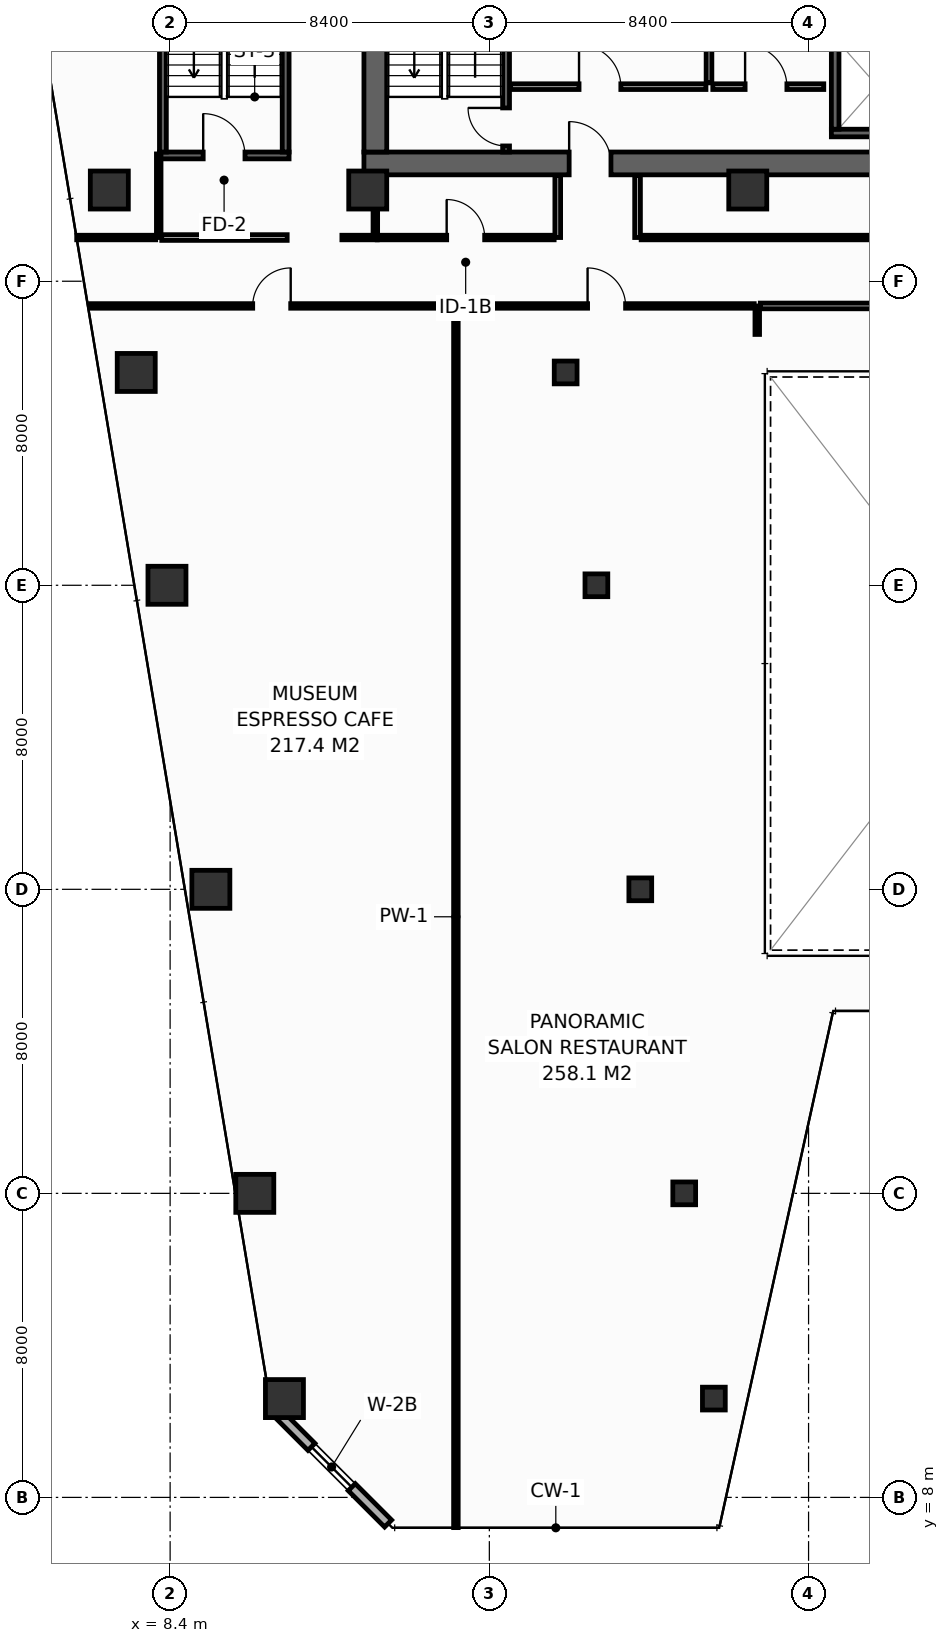
"""IFC4 building model, lengths in metres.
Left out: names, types, materials, properties, quantities, classifications, styles, units other than length and angle.
Written with IfcOpenShell. Run it as: python <this file> out.ifc"""

import sys

from ifc_helpers import new_model, si_unit, direction, frame, frame_2d, origin, origin_2d, place, context, subcontext, project, spatial, rectangle, hollow_rectangle, extrude, element, fill, save


model = new_model("IFC4")
c1 = context("Model", 3, precision=1e-05, world=origin(), true_north=direction((0.0, 1.0)))
c2 = subcontext(c1, "Body", "Model", "MODEL_VIEW")
j1 = project(units=[si_unit("LENGTHUNIT", "METRE"), si_unit("PLANEANGLEUNIT", "RADIAN")], contexts=[c1])
p1 = place(None, origin())
s1 = spatial("IfcSite", under=j1, at=p1, CompositionType="ELEMENT")
p2 = place(p1, origin())
s2 = spatial("IfcBuilding", under=s1, at=p2, CompositionType="ELEMENT")
p3 = place(p2, frame((0.0, 0.0, 110.4)))
s3 = spatial("IfcBuildingStorey", under=s2, at=p3, CompositionType="ELEMENT", Elevation=110.4)
p4 = place(p3, frame((13.5, 43.1, 0.0), z_axis=(0.0, 0.0, 1.0), x_axis=(1.0, 0.0, 0.0)))
e1 = element("IfcWall", 1, at=p4, inside=s3, PredefinedType="SHEAR", context=c2, shape_type="SweptSolid", body=[
    extrude(rectangle(XDim=32.9, YDim=0.6, at=frame_2d((16.45, 0.0))), origin(), (0.0, 0.0, 1.0), 4.15),
])
p5 = place(p4, frame((5.4, 0.0, 0.0)))
e2 = element("IfcOpeningElement", 2, at=p5, cuts=e1, PredefinedType="OPENING", context=c2, shape_type="SweptSolid", body=[
    extrude(rectangle(XDim=1.1, YDim=2.15, at=frame_2d((0.55, 1.075))), frame((0.0, 0.31, 0.0), z_axis=(0.0, -1.0, 0.0), x_axis=(1.0, 0.0, 0.0)), (0.0, 0.0, 1.0), 0.62),
])
p6 = place(p4, frame((25.6, 0.0, 0.0)))
e3 = element("IfcOpeningElement", 3, at=p6, cuts=e1, PredefinedType="OPENING", context=c2, shape_type="SweptSolid", body=[
    extrude(rectangle(XDim=1.1, YDim=2.15, at=frame_2d((0.55, 1.075))), frame((0.0, 0.31, 0.0), z_axis=(0.0, -1.0, 0.0), x_axis=(1.0, 0.0, 0.0)), (0.0, 0.0, 1.0), 0.62),
])
p7 = place(p3, frame((13.8, 43.4, 0.0), z_axis=(0.0, 0.0, 1.0), x_axis=(0.0, 1.0, 0.0)))
e4 = element("IfcWall", 4, at=p7, inside=s3, PredefinedType="SHEAR", context=c2, shape_type="SweptSolid", body=[
    extrude(rectangle(XDim=10.4, YDim=0.6, at=frame_2d((5.2, 0.0))), origin(), (0.0, 0.0, 1.0), 4.15),
])
for number, where, z_axis, x_axis in (
    (5, (6.8, 42.4, 0.0), (0.0, 0.0, 1.0), (1.0, 0.0, 0.0)),
    (6, (13.6, 42.4, 0.0), (0.0, 0.0, 1.0), (1.0, 0.0, 0.0)),
    (7, (23.6, 42.4, 0.0), (0.0, 0.0, 1.0), (1.0, 0.0, 0.0)),
    (8, (11.408, 10.6, 0.0), (0.0, 0.0, 1.0), (1.0, 0.0, 0.0)),
):
    element("IfcColumn", number, at=place(p3, frame(where, z_axis=z_axis, x_axis=x_axis)), inside=s3, PredefinedType="COLUMN", context=c2, shape_type="SweptSolid", body=[
        extrude(hollow_rectangle(XDim=1.0, YDim=1.0, WallThickness=0.045, at=origin_2d()), origin(), (0.0, 0.0, 1.0), 4.4),
    ])
p8 = place(p3, frame((22.708, 10.6, 0.0), z_axis=(0.0, 0.0, 1.0), x_axis=(1.0, 0.0, 0.0)))
e9 = element("IfcColumn", 9, at=p8, inside=s3, PredefinedType="COLUMN", context=c2, shape_type="SweptSolid", body=[
    extrude(hollow_rectangle(XDim=0.6, YDim=0.6, WallThickness=0.028, at=origin_2d()), origin(), (0.0, 0.0, 1.0), 4.4),
])
p9 = place(p3, frame((10.628, 16.0, 0.0), z_axis=(0.0, 0.0, 1.0), x_axis=(1.0, 0.0, 0.0)))
e10 = element("IfcColumn", 10, at=p9, inside=s3, PredefinedType="COLUMN", context=c2, shape_type="SweptSolid", body=[
    extrude(hollow_rectangle(XDim=1.0, YDim=1.0, WallThickness=0.045, at=origin_2d()), origin(), (0.0, 0.0, 1.0), 4.4),
])
p10 = place(p3, frame((21.928, 16.0, 0.0), z_axis=(0.0, 0.0, 1.0), x_axis=(1.0, 0.0, 0.0)))
e11 = element("IfcColumn", 11, at=p10, inside=s3, PredefinedType="COLUMN", context=c2, shape_type="SweptSolid", body=[
    extrude(hollow_rectangle(XDim=0.6, YDim=0.6, WallThickness=0.028, at=origin_2d()), origin(), (0.0, 0.0, 1.0), 4.4),
])
p11 = place(p3, frame((9.472, 24.0, 0.0), z_axis=(0.0, 0.0, 1.0), x_axis=(1.0, 0.0, 0.0)))
e12 = element("IfcColumn", 12, at=p11, inside=s3, PredefinedType="COLUMN", context=c2, shape_type="SweptSolid", body=[
    extrude(hollow_rectangle(XDim=1.0, YDim=1.0, WallThickness=0.045, at=origin_2d()), origin(), (0.0, 0.0, 1.0), 4.4),
])
p12 = place(p3, frame((20.772, 24.0, 0.0), z_axis=(0.0, 0.0, 1.0), x_axis=(1.0, 0.0, 0.0)))
e13 = element("IfcColumn", 13, at=p12, inside=s3, PredefinedType="COLUMN", context=c2, shape_type="SweptSolid", body=[
    extrude(hollow_rectangle(XDim=0.6, YDim=0.6, WallThickness=0.028, at=origin_2d()), origin(), (0.0, 0.0, 1.0), 4.4),
])
p13 = place(p3, frame((8.317, 32.0, 0.0), z_axis=(0.0, 0.0, 1.0), x_axis=(1.0, 0.0, 0.0)))
e14 = element("IfcColumn", 14, at=p13, inside=s3, PredefinedType="COLUMN", context=c2, shape_type="SweptSolid", body=[
    extrude(hollow_rectangle(XDim=1.0, YDim=1.0, WallThickness=0.045, at=origin_2d()), origin(), (0.0, 0.0, 1.0), 4.4),
])
p14 = place(p3, frame((19.617, 32.0, 0.0), z_axis=(0.0, 0.0, 1.0), x_axis=(1.0, 0.0, 0.0)))
e15 = element("IfcColumn", 15, at=p14, inside=s3, PredefinedType="COLUMN", context=c2, shape_type="SweptSolid", body=[
    extrude(hollow_rectangle(XDim=0.6, YDim=0.6, WallThickness=0.028, at=origin_2d()), origin(), (0.0, 0.0, 1.0), 4.4),
])
p15 = place(p3, frame((7.508, 37.6, 0.0), z_axis=(0.0, 0.0, 1.0), x_axis=(1.0, 0.0, 0.0)))
e16 = element("IfcColumn", 16, at=p15, inside=s3, PredefinedType="COLUMN", context=c2, shape_type="SweptSolid", body=[
    extrude(hollow_rectangle(XDim=1.0, YDim=1.0, WallThickness=0.045, at=origin_2d()), origin(), (0.0, 0.0, 1.0), 4.4),
])
p16 = place(p3, frame((18.808, 37.6, 0.0), z_axis=(0.0, 0.0, 1.0), x_axis=(1.0, 0.0, 0.0)))
e17 = element("IfcColumn", 17, at=p16, inside=s3, PredefinedType="COLUMN", context=c2, shape_type="SweptSolid", body=[
    extrude(hollow_rectangle(XDim=0.6, YDim=0.6, WallThickness=0.028, at=origin_2d()), origin(), (0.0, 0.0, 1.0), 4.4),
])
p17 = place(p3, frame((25.8, 43.9, 0.0), z_axis=(0.0, 0.0, 1.0), x_axis=(1.0, 0.0, 0.0)))
e18 = element("IfcWall", 18, at=p17, inside=s3, PredefinedType="SHEAR", context=c2, shape_type="SweptSolid", body=[
    extrude(rectangle(XDim=2.575, YDim=0.2, at=frame_2d((1.288, 0.0))), origin(), (0.0, 0.0, 1.0), 4.15),
])
p18 = place(p3, frame((25.9, 44.0, 0.0), z_axis=(0.0, 0.0, 1.0), x_axis=(0.0, 1.0, 0.0)))
e19 = element("IfcWall", 19, at=p18, inside=s3, PredefinedType="SHEAR", context=c2, shape_type="SweptSolid", body=[
    extrude(rectangle(XDim=2.3, YDim=0.2, at=frame_2d((1.15, 0.0))), origin(), (0.0, 0.0, 1.0), 4.15),
])
p19 = place(p3, frame((17.24, 43.4, 0.0), z_axis=(0.0, 0.0, 1.0), x_axis=(0.0, 1.0, 0.0)))
e20 = element("IfcWall", 20, at=p19, inside=s3, PredefinedType="SHEAR", context=c2, shape_type="SweptSolid", body=[
    extrude(rectangle(XDim=10.4, YDim=0.18, at=frame_2d((5.2, 0.0))), origin(), (0.0, 0.0, 1.0), 4.15),
])
p20 = place(p19, frame((0.16, 0.0, 0.0)))
e21 = element("IfcOpeningElement", 21, at=p20, cuts=e20, PredefinedType="OPENING", context=c2, shape_type="SweptSolid", body=[
    extrude(rectangle(XDim=1.0, YDim=2.15, at=frame_2d((0.5, 1.075))), frame((0.0, 0.1, 0.0), z_axis=(0.0, -1.0, 0.0), x_axis=(1.0, 0.0, 0.0)), (0.0, 0.0, 1.0), 0.2),
])
p21 = place(p3, frame((8.12, 43.31, 0.0), z_axis=(0.0, 0.0, 1.0), x_axis=(1.0, 0.0, 0.0)))
e22 = element("IfcWall", 22, at=p21, inside=s3, PredefinedType="SHEAR", context=c2, shape_type="SweptSolid", body=[
    extrude(rectangle(XDim=3.41, YDim=0.18, at=frame_2d((1.705, 0.0))), origin(), (0.0, 0.0, 1.0), 4.15),
])
p22 = place(p21, frame((1.15, 0.0, 0.0)))
e23 = element("IfcOpeningElement", 23, at=p22, cuts=e22, PredefinedType="OPENING", context=c2, shape_type="SweptSolid", body=[
    extrude(rectangle(XDim=1.1, YDim=2.15, at=frame_2d((0.55, 1.075))), frame((0.0, 0.1, 0.0), z_axis=(0.0, -1.0, 0.0), x_axis=(1.0, 0.0, 0.0)), (0.0, 0.0, 1.0), 0.2),
])
for number, where, z_axis, x_axis in (
    (24, (11.44, 43.4, 0.0), (0.0, 0.0, 1.0), (0.0, 1.0, 0.0)),
    (25, (8.21, 53.8, 0.0), (0.0, 0.0, 1.0), (0.0, -1.0, 0.0)),
):
    element("IfcWall", number, at=place(p3, frame(where, z_axis=z_axis, x_axis=x_axis)), inside=s3, PredefinedType="SHEAR", context=c2, shape_type="SweptSolid", body=[
        extrude(rectangle(XDim=10.4, YDim=0.18, at=frame_2d((5.2, 0.0))), origin(), (0.0, 0.0, 1.0), 4.15),
    ])
p23 = place(p3, frame((17.36, 45.12, 0.0), z_axis=(0.0, 0.0, 1.0), x_axis=(1.0, 0.0, 0.0)))
e26 = element("IfcWall", 26, at=p23, inside=s3, PredefinedType="PARTITIONING", context=c2, shape_type="SweptSolid", body=[
    extrude(rectangle(XDim=5.14, YDim=0.15, at=frame_2d((2.57, 0.0))), origin(), (0.0, 0.0, 1.0), 4.15),
])
p24 = place(p23, frame((1.8, 0.0, 0.0)))
e27 = element("IfcOpeningElement", 27, at=p24, cuts=e26, PredefinedType="OPENING", context=c2, shape_type="SweptSolid", body=[
    extrude(rectangle(XDim=1.1, YDim=2.15, at=frame_2d((0.55, 1.075))), frame((0.0, 0.085, 0.0), z_axis=(0.0, -1.0, 0.0), x_axis=(1.0, 0.0, 0.0)), (0.0, 0.0, 1.0), 0.17),
])
p25 = place(p3, frame((22.58, 50.55, 0.0), z_axis=(0.0, 0.0, 1.0), x_axis=(0.0, -1.0, 0.0)))
e28 = element("IfcWall", 28, at=p25, inside=s3, PredefinedType="PARTITIONING", context=c2, shape_type="SweptSolid", body=[
    extrude(rectangle(XDim=5.33, YDim=0.15, at=frame_2d((2.665, 0.0))), origin(), (0.0, 0.0, 1.0), 4.15),
])
p26 = place(p25, frame((1.8, 0.0, 0.0)))
e29 = element("IfcOpeningElement", 29, at=p26, cuts=e28, PredefinedType="OPENING", context=c2, shape_type="SweptSolid", body=[
    extrude(rectangle(XDim=1.1, YDim=2.15, at=frame_2d((0.55, 1.075))), frame((0.0, 0.085, 0.0), z_axis=(0.0, -1.0, 0.0), x_axis=(1.0, 0.0, 0.0)), (0.0, 0.0, 1.0), 0.17),
])
p27 = place(p3, frame((22.68, 45.12, 0.0), z_axis=(0.0, 0.0, 1.0), x_axis=(1.0, 0.0, 0.0)))
e30 = element("IfcWall", 30, at=p27, inside=s3, PredefinedType="PARTITIONING", context=c2, shape_type="SweptSolid", body=[
    extrude(rectangle(XDim=2.92, YDim=0.15, at=frame_2d((1.46, 0.0))), origin(), (0.0, 0.0, 1.0), 4.15),
])
p28 = place(p27, frame((0.85, 0.0, 0.0)))
e31 = element("IfcOpeningElement", 31, at=p28, cuts=e30, PredefinedType="OPENING", context=c2, shape_type="SweptSolid", body=[
    extrude(rectangle(XDim=1.1, YDim=2.15, at=frame_2d((0.55, 1.075))), frame((0.0, 0.085, 0.0), z_axis=(0.0, -1.0, 0.0), x_axis=(1.0, 0.0, 0.0)), (0.0, 0.0, 1.0), 0.17),
])
p29 = place(p3, frame((11.162, 10.287, 0.0), z_axis=(0.0, 0.0, 1.0), x_axis=(0.70707775441, -0.707135806771, 0.0)))
e32 = element("IfcWall", 32, at=p29, inside=s3, PredefinedType="STANDARD", context=c2, shape_type="SweptSolid", body=[
    extrude(rectangle(XDim=4.206, YDim=0.26, at=frame_2d((2.103, 0.0))), origin(), (0.0, 0.0, 1.0), 4.15),
])
p30 = place(p29, frame((1.353, 0.0, 0.9)))
e33 = element("IfcOpeningElement", 33, at=p30, cuts=e32, PredefinedType="OPENING", context=c2, shape_type="SweptSolid", body=[
    extrude(rectangle(XDim=1.5, YDim=1.85, at=frame_2d((0.75, 0.925))), frame((0.0, 0.14, 0.0), z_axis=(0.0, -1.0, 0.0), x_axis=(1.0, 0.0, 0.0)), (0.0, 0.0, 1.0), 0.28),
])
p31 = place(p3, frame((12.92, 41.15, 0.0), z_axis=(0.0, 0.0, 1.0), x_axis=(1.0, 0.0, 0.0)))
e34 = element("IfcWall", 34, at=p31, inside=s3, PredefinedType="PARTITIONING", context=c2, shape_type="SweptSolid", body=[
    extrude(rectangle(XDim=0.93, YDim=0.12, at=frame_2d((0.465, 0.0))), origin(), (0.0, 0.0, 1.0), 4.15),
])
p32 = place(p3, frame((13.8, 41.23, 0.0), z_axis=(0.0, 0.0, 1.0), x_axis=(0.0, 1.0, 0.0)))
e35 = element("IfcWall", 35, at=p32, inside=s3, PredefinedType="PARTITIONING", context=c2, shape_type="SweptSolid", body=[
    extrude(rectangle(XDim=1.55, YDim=0.12, at=frame_2d((0.775, 0.0))), origin(), (0.0, 0.0, 1.0), 4.15),
])
p33 = place(p3, frame((8.1, 41.15, 0.0), z_axis=(0.0, 0.0, 1.0), x_axis=(0.0, 1.0, 0.0)))
e36 = element("IfcWall", 36, at=p33, inside=s3, PredefinedType="PARTITIONING", context=c2, shape_type="SweptSolid", body=[
    extrude(rectangle(XDim=2.2, YDim=0.12, at=frame_2d((1.1, 0.0))), origin(), (0.0, 0.0, 1.0), 3.335),
])
p34 = place(p3, frame((8.18, 41.15, 0.0), z_axis=(0.0, 0.0, 1.0), x_axis=(1.0, 0.0, 0.0)))
e37 = element("IfcWall", 37, at=p34, inside=s3, PredefinedType="PARTITIONING", context=c2, shape_type="SweptSolid", body=[
    extrude(rectangle(XDim=3.3, YDim=0.15, at=frame_2d((1.65, 0.0))), origin(), (0.0, 0.0, 1.0), 4.15),
])
p35 = place(p3, frame((5.942, 41.15, 0.0), z_axis=(0.0, 0.0, 1.0), x_axis=(1.0, 0.0, 0.0)))
e38 = element("IfcWall", 38, at=p35, inside=s3, PredefinedType="PARTITIONING", context=c2, shape_type="SweptSolid", body=[
    extrude(rectangle(XDim=2.078, YDim=0.12, at=frame_2d((1.039, 0.0))), origin(), (0.0, 0.0, 1.0), 3.635),
])
for number, where, z_axis, x_axis in (
    (39, (18.6, 41.15, 0.0), (0.0, 0.0, 1.0), (0.0, 1.0, 0.0)),
    (40, (20.7, 41.15, 0.0), (0.0, 0.0, 1.0), (0.0, 1.0, 0.0)),
):
    element("IfcWall", number, at=place(p3, frame(where, z_axis=z_axis, x_axis=x_axis)), inside=s3, PredefinedType="PARTITIONING", context=c2, shape_type="SweptSolid", body=[
        extrude(rectangle(XDim=1.63, YDim=0.15, at=frame_2d((0.815, 0.0))), origin(), (0.0, 0.0, 1.0), 4.15),
    ])
p36 = place(p3, frame((13.85, 41.15, 0.0), z_axis=(0.0, 0.0, 1.0), x_axis=(1.0, 0.0, 0.0)))
e41 = element("IfcWall", 41, at=p36, inside=s3, PredefinedType="PARTITIONING", context=c2, shape_type="SweptSolid", body=[
    extrude(rectangle(XDim=4.655, YDim=0.12, at=frame_2d((2.327, 0.0))), origin(), (0.0, 0.0, 1.0), 4.15),
])
p37 = place(p36, frame((1.827, 0.0, 0.0)))
e42 = element("IfcOpeningElement", 42, at=p37, cuts=e41, PredefinedType="OPENING", context=c2, shape_type="SweptSolid", body=[
    extrude(rectangle(XDim=1.0, YDim=2.15, at=frame_2d((0.5, 1.075))), frame((0.0, 0.07, 0.0), z_axis=(0.0, -1.0, 0.0), x_axis=(1.0, 0.0, 0.0)), (0.0, 0.0, 1.0), 0.14),
])
p38 = place(p3, frame((20.795, 41.15, 0.0), z_axis=(0.0, 0.0, 1.0), x_axis=(1.0, 0.0, 0.0)))
e43 = element("IfcWall", 43, at=p38, inside=s3, PredefinedType="PARTITIONING", context=c2, shape_type="SweptSolid", body=[
    extrude(rectangle(XDim=17.91, YDim=0.12, at=frame_2d((8.955, 0.0))), origin(), (0.0, 0.0, 1.0), 3.335),
])
p39 = place(p38, frame((8.455, 0.0, 0.0)))
e44 = element("IfcOpeningElement", 44, at=p39, cuts=e43, PredefinedType="OPENING", context=c2, shape_type="SweptSolid", body=[
    extrude(rectangle(XDim=1.0, YDim=2.15, at=frame_2d((0.5, 1.075))), frame((0.0, 0.07, 0.0), z_axis=(0.0, -1.0, 0.0), x_axis=(1.0, 0.0, 0.0)), (0.0, 0.0, 1.0), 0.14),
])
p40 = place(p3, frame((15.92, 7.205, 0.0), z_axis=(0.0, 0.0, 1.0), x_axis=(0.0, 1.0, 0.0)))
e45 = element("IfcWall", 45, at=p40, inside=s3, PredefinedType="PARTITIONING", context=c2, shape_type="SweptSolid", body=[
    extrude(rectangle(XDim=32.145, YDim=0.12, at=frame_2d((16.073, 0.0))), origin(), (0.0, 0.0, 1.0), 3.335),
])
p41 = place(p3, frame((23.85, 38.6, 0.0), z_axis=(0.0, 0.0, 1.0), x_axis=(0.0, 1.0, 0.0)))
e46 = element("IfcWall", 46, at=p41, inside=s3, PredefinedType="PARTITIONING", context=c2, shape_type="SweptSolid", body=[
    extrude(rectangle(XDim=0.75, YDim=0.12, at=frame_2d((0.375, 0.0))), origin(), (0.0, 0.0, 1.0), 4.15),
])
p42 = place(p3, frame((6.305, 39.35, 0.0), z_axis=(0.0, 0.0, 1.0), x_axis=(1.0, 0.0, 0.0)))
e47 = element("IfcWall", 47, at=p42, inside=s3, PredefinedType="PARTITIONING", context=c2, shape_type="SweptSolid", body=[
    extrude(rectangle(XDim=9.535, YDim=0.12, at=frame_2d((4.768, 0.0))), origin(), (0.0, 0.0, 1.0), 3.635),
])
p43 = place(p42, frame((4.268, 0.0, 0.0)))
e48 = element("IfcOpeningElement", 48, at=p43, cuts=e47, PredefinedType="OPENING", context=c2, shape_type="SweptSolid", body=[
    extrude(rectangle(XDim=1.0, YDim=2.15, at=frame_2d((0.5, 1.075))), frame((0.0, 0.07, 0.0), z_axis=(0.0, -1.0, 0.0), x_axis=(1.0, 0.0, 0.0)), (0.0, 0.0, 1.0), 0.14),
])
p44 = place(p3, frame((16.0, 39.35, 0.0), z_axis=(0.0, 0.0, 1.0), x_axis=(1.0, 0.0, 0.0)))
e49 = element("IfcWall", 49, at=p44, inside=s3, PredefinedType="PARTITIONING", context=c2, shape_type="SweptSolid", body=[
    extrude(rectangle(XDim=7.77, YDim=0.12, at=frame_2d((3.885, 0.0))), origin(), (0.0, 0.0, 1.0), 3.335),
])
p45 = place(p44, frame((3.385, 0.0, 0.0)))
e50 = element("IfcOpeningElement", 50, at=p45, cuts=e49, PredefinedType="OPENING", context=c2, shape_type="SweptSolid", body=[
    extrude(rectangle(XDim=1.0, YDim=2.15, at=frame_2d((0.5, 1.075))), frame((0.0, 0.07, 0.0), z_axis=(0.0, -1.0, 0.0), x_axis=(1.0, 0.0, 0.0)), (0.0, 0.0, 1.0), 0.14),
])
p46 = place(p3, frame((23.93, 39.35, 0.0), z_axis=(0.0, 0.0, 1.0), x_axis=(1.0, 0.0, 0.0)))
e51 = element("IfcWall", 51, at=p46, inside=s3, PredefinedType="PARTITIONING", context=c2, shape_type="SweptSolid", body=[
    extrude(rectangle(XDim=12.14, YDim=0.15, at=frame_2d((6.07, 0.0))), origin(), (0.0, 0.0, 1.0), 4.15),
])
p47 = place(p20, origin())
e52 = element("IfcDoor", 52, at=p47, inside=s3, OperationType="SINGLE_SWING_RIGHT", PredefinedType="DOOR", context=c2, shape_type="SweptSolid", body=[
    extrude(rectangle(XDim=1.0, YDim=2.15, at=frame_2d((0.5, 1.075))), frame((0.0, 0.025, 0.0), z_axis=(0.0, -1.0, 0.0), x_axis=(1.0, 0.0, 0.0)), (0.0, 0.0, 1.0), 0.05),
])
fill(e21, e52)
p48 = place(p22, origin())
e53 = element("IfcDoor", 53, at=p48, inside=s3, OperationType="SINGLE_SWING_LEFT", PredefinedType="DOOR", context=c2, shape_type="SweptSolid", body=[
    extrude(rectangle(XDim=1.1, YDim=2.15, at=frame_2d((0.55, 1.075))), frame((0.0, 0.025, 0.0), z_axis=(0.0, -1.0, 0.0), x_axis=(1.0, 0.0, 0.0)), (0.0, 0.0, 1.0), 0.05),
])
fill(e23, e53)
p49 = place(p24, origin())
e54 = element("IfcDoor", 54, at=p49, inside=s3, OperationType="SINGLE_SWING_LEFT", PredefinedType="DOOR", context=c2, shape_type="SweptSolid", body=[
    extrude(rectangle(XDim=1.1, YDim=2.15, at=frame_2d((0.55, 1.075))), frame((0.0, 0.025, 0.0), z_axis=(0.0, -1.0, 0.0), x_axis=(1.0, 0.0, 0.0)), (0.0, 0.0, 1.0), 0.05),
])
fill(e27, e54)
p50 = place(p28, origin())
e55 = element("IfcDoor", 55, at=p50, inside=s3, OperationType="SINGLE_SWING_LEFT", PredefinedType="DOOR", context=c2, shape_type="SweptSolid", body=[
    extrude(rectangle(XDim=1.1, YDim=2.15, at=frame_2d((0.55, 1.075))), frame((0.0, 0.025, 0.0), z_axis=(0.0, -1.0, 0.0), x_axis=(1.0, 0.0, 0.0)), (0.0, 0.0, 1.0), 0.05),
])
fill(e31, e55)
p51 = place(p5, origin())
e56 = element("IfcDoor", 56, at=p51, inside=s3, OperationType="SINGLE_SWING_LEFT", PredefinedType="DOOR", context=c2, shape_type="SweptSolid", body=[
    extrude(rectangle(XDim=1.1, YDim=2.15, at=frame_2d((0.55, 1.075))), frame((0.0, 0.025, 0.0), z_axis=(0.0, -1.0, 0.0), x_axis=(1.0, 0.0, 0.0)), (0.0, 0.0, 1.0), 0.05),
])
fill(e2, e56)
p52 = place(p30, origin())
e57 = element("IfcWindow", 57, at=p52, inside=s3, PartitioningType="SINGLE_PANEL", PredefinedType="WINDOW", context=c2, shape_type="SweptSolid", body=[
    extrude(rectangle(XDim=1.5, YDim=1.85, at=frame_2d((0.75, 0.925))), frame((0.0, 0.03, 0.0), z_axis=(0.0, -1.0, 0.0), x_axis=(1.0, 0.0, 0.0)), (0.0, 0.0, 1.0), 0.06),
])
fill(e33, e57)
p53 = place(p37, origin())
e58 = element("IfcDoor", 58, at=p53, inside=s3, OperationType="SINGLE_SWING_LEFT", PredefinedType="DOOR", context=c2, shape_type="SweptSolid", body=[
    extrude(rectangle(XDim=1.0, YDim=2.15, at=frame_2d((0.5, 1.075))), frame((0.0, 0.025, 0.0), z_axis=(0.0, -1.0, 0.0), x_axis=(1.0, 0.0, 0.0)), (0.0, 0.0, 1.0), 0.05),
])
fill(e42, e58)
p54 = place(p43, origin())
e59 = element("IfcDoor", 59, at=p54, inside=s3, OperationType="SINGLE_SWING_RIGHT", PredefinedType="DOOR", context=c2, shape_type="SweptSolid", body=[
    extrude(rectangle(XDim=1.0, YDim=2.15, at=frame_2d((0.5, 1.075))), frame((0.0, 0.025, 0.0), z_axis=(0.0, -1.0, 0.0), x_axis=(1.0, 0.0, 0.0)), (0.0, 0.0, 1.0), 0.05),
])
fill(e48, e59)
p55 = place(p45, origin())
e60 = element("IfcDoor", 60, at=p55, inside=s3, OperationType="SINGLE_SWING_LEFT", PredefinedType="DOOR", context=c2, shape_type="SweptSolid", body=[
    extrude(rectangle(XDim=1.0, YDim=2.15, at=frame_2d((0.5, 1.075))), frame((0.0, 0.025, 0.0), z_axis=(0.0, -1.0, 0.0), x_axis=(1.0, 0.0, 0.0)), (0.0, 0.0, 1.0), 0.05),
])
fill(e50, e60)
save(model, sys.argv[1])
